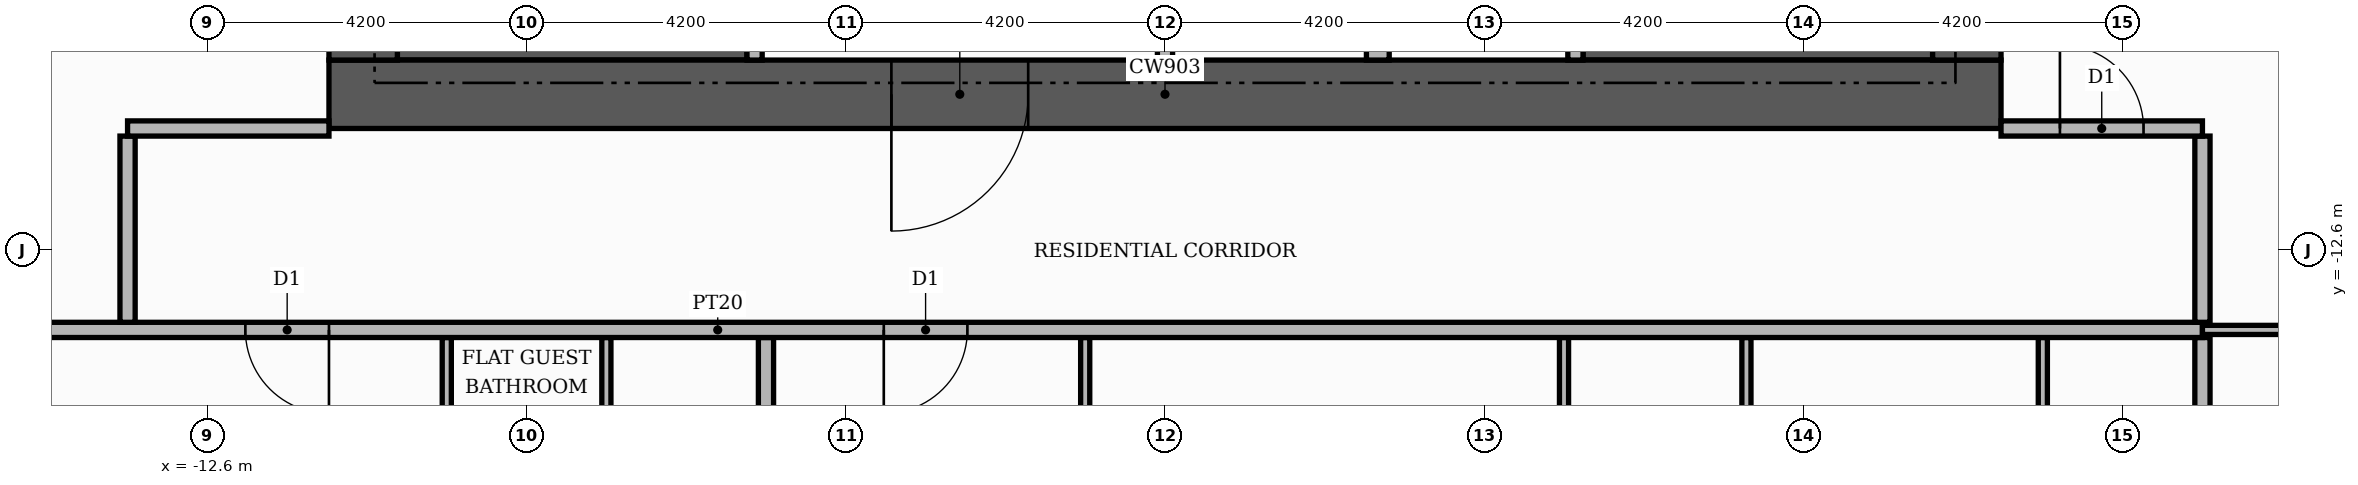
"""IFC4 building model, lengths in metres.
Left out: names, types, materials, properties, quantities, classifications, styles, units other than length and angle.
Written with IfcOpenShell. Run it as: python <this file> out.ifc"""

import sys

from ifc_helpers import new_model, si_unit, direction, frame, frame_2d, origin, place, context, subcontext, project, spatial, rectangle, extrude, element, fill, save


model = new_model("IFC4")
c1 = context("Model", 3, precision=1e-05, world=origin(), true_north=direction((0.0, 1.0)))
c2 = subcontext(c1, "Body", "Model", "MODEL_VIEW")
j1 = project(units=[si_unit("LENGTHUNIT", "METRE"), si_unit("PLANEANGLEUNIT", "RADIAN")], contexts=[c1])
p1 = place(None, origin())
s1 = spatial("IfcSite", under=j1, at=p1, CompositionType="ELEMENT")
p2 = place(p1, origin())
s2 = spatial("IfcBuilding", under=s1, at=p2, CompositionType="ELEMENT")
p3 = place(p2, frame((0.0, 0.0, 172.8)))
s3 = spatial("IfcBuildingStorey", under=s2, at=p3, CompositionType="ELEMENT", Elevation=172.8)
for number, where, z_axis, x_axis in (
    (1, (-10.1, -9.15, 0.0), (0.0, 0.0, 1.0), (1.0, 0.0, 0.0)),
    (2, (5.5, -9.15, 0.0), (0.0, 0.0, 1.0), (1.0, 0.0, 0.0)),
):
    element("IfcWall", number, at=place(p3, frame(where, z_axis=z_axis, x_axis=x_axis)), inside=s3, PredefinedType="SHEAR", context=c2, shape_type="SweptSolid", body=[
        extrude(rectangle(XDim=4.6, YDim=1.9, at=frame_2d((2.3, 0.0))), origin(), (0.0, 0.0, 1.0), 3.48),
    ])
p4 = place(p3, frame((-11.0, -10.55, 0.0), z_axis=(0.0, 0.0, 1.0), x_axis=(1.0, 0.0, 0.0)))
e3 = element("IfcWall", 3, at=p4, inside=s3, PredefinedType="SHEAR", context=c2, shape_type="SweptSolid", body=[
    extrude(rectangle(XDim=22.0, YDim=0.9, at=frame_2d((11.0, 0.0))), origin(), (0.0, 0.0, 1.0), 3.48),
])
p5 = place(p4, frame((7.4, 0.0, 0.0)))
e4 = element("IfcOpeningElement", 4, at=p5, cuts=e3, PredefinedType="OPENING", context=c2, shape_type="SweptSolid", body=[
    extrude(rectangle(XDim=1.8, YDim=2.2, at=frame_2d((0.9, 1.1))), frame((0.0, 0.46, 0.0), z_axis=(0.0, -1.0, 0.0), x_axis=(1.0, 0.0, 0.0)), (0.0, 0.0, 1.0), 0.92),
])
for number, where, z_axis, x_axis in (
    (5, (-10.55, -10.1, 0.0), (0.0, 0.0, 1.0), (0.0, 1.0, 0.0)),
    (6, (10.55, -10.1, 0.0), (0.0, 0.0, 1.0), (0.0, 1.0, 0.0)),
):
    element("IfcWall", number, at=place(p3, frame(where, z_axis=z_axis, x_axis=x_axis)), inside=s3, PredefinedType="SHEAR", context=c2, shape_type="SweptSolid", body=[
        extrude(rectangle(XDim=20.2, YDim=0.9, at=frame_2d((10.1, 0.0))), origin(), (0.0, 0.0, 1.0), 3.48),
    ])
p6 = place(p3, frame((-5.4, -10.1, 0.0), z_axis=(0.0, 0.0, 1.0), x_axis=(0.0, 1.0, 0.0)))
e7 = element("IfcWall", 7, at=p6, inside=s3, PredefinedType="PARTITIONING", context=c2, shape_type="SweptSolid", body=[
    extrude(rectangle(XDim=4.6, YDim=0.2, at=frame_2d((2.3, 0.0))), origin(), (0.0, 0.0, 1.0), 3.48),
])
p7 = place(p6, frame((2.9, 0.0, 0.0)))
e8 = element("IfcOpeningElement", 8, at=p7, cuts=e7, PredefinedType="OPENING", context=c2, shape_type="SweptSolid", body=[
    extrude(rectangle(XDim=1.0, YDim=2.1, at=frame_2d((0.5, 1.05))), frame((0.0, 0.11, 0.0), z_axis=(0.0, -1.0, 0.0), x_axis=(1.0, 0.0, 0.0)), (0.0, 0.0, 1.0), 0.22),
])
p8 = place(p3, frame((0.0, -10.1, 0.0), z_axis=(0.0, 0.0, 1.0), x_axis=(0.0, 1.0, 0.0)))
e9 = element("IfcWall", 9, at=p8, inside=s3, PredefinedType="PARTITIONING", context=c2, shape_type="SweptSolid", body=[
    extrude(rectangle(XDim=2.2, YDim=0.2, at=frame_2d((1.1, 0.0))), origin(), (0.0, 0.0, 1.0), 3.48),
])
p9 = place(p3, frame((2.8, -10.1, 0.0), z_axis=(0.0, 0.0, 1.0), x_axis=(0.0, 1.0, 0.0)))
e10 = element("IfcWall", 10, at=p9, inside=s3, PredefinedType="PARTITIONING", context=c2, shape_type="SweptSolid", body=[
    extrude(rectangle(XDim=2.2, YDim=0.3, at=frame_2d((1.1, 0.0))), origin(), (0.0, 0.0, 1.0), 3.48),
])
p10 = place(p3, frame((5.4, -10.1, 0.0), z_axis=(0.0, 0.0, 1.0), x_axis=(0.0, 1.0, 0.0)))
e11 = element("IfcWall", 11, at=p10, inside=s3, PredefinedType="PARTITIONING", context=c2, shape_type="SweptSolid", body=[
    extrude(rectangle(XDim=4.6, YDim=0.2, at=frame_2d((2.3, 0.0))), origin(), (0.0, 0.0, 1.0), 3.48),
])
p11 = place(p10, frame((2.9, 0.0, 0.0)))
e12 = element("IfcOpeningElement", 12, at=p11, cuts=e11, PredefinedType="OPENING", context=c2, shape_type="SweptSolid", body=[
    extrude(rectangle(XDim=1.0, YDim=2.1, at=frame_2d((0.5, 1.05))), frame((0.0, 0.11, 0.0), z_axis=(0.0, -1.0, 0.0), x_axis=(1.0, 0.0, 0.0)), (0.0, 0.0, 1.0), 0.22),
])
for number, where, z_axis, x_axis in (
    (13, (-5.25, -25.42, 0.0), (0.0, 0.0, 1.0), (0.0, 1.0, 0.0)),
    (14, (13.65, -25.42, 0.0), (0.0, 0.0, 1.0), (0.0, 1.0, 0.0)),
):
    element("IfcWall", number, at=place(p3, frame(where, z_axis=z_axis, x_axis=x_axis)), inside=s3, PredefinedType="PARTITIONING", context=c2, shape_type="SweptSolid", body=[
        extrude(rectangle(XDim=11.67, YDim=0.2, at=frame_2d((5.835, 0.0))), origin(), (0.0, 0.0, 1.0), 3.48),
    ])
for number, where, z_axis, x_axis in (
    (15, (-1.05, -18.86, 0.0), (0.0, 0.0, 1.0), (0.0, 1.0, 0.0)),
    (16, (5.25, -18.86, 0.0), (0.0, 0.0, 1.0), (0.0, 1.0, 0.0)),
    (17, (7.65, -18.86, 0.0), (0.0, 0.0, 1.0), (0.0, 1.0, 0.0)),
    (18, (11.55, -18.86, 0.0), (0.0, 0.0, 1.0), (0.0, 1.0, 0.0)),
):
    element("IfcWall", number, at=place(p3, frame(where, z_axis=z_axis, x_axis=x_axis)), inside=s3, PredefinedType="PARTITIONING", context=c2, shape_type="SweptSolid", body=[
        extrude(rectangle(XDim=5.11, YDim=0.12, at=frame_2d((2.555, 0.0))), origin(), (0.0, 0.0, 1.0), 3.48),
    ])
p12 = place(p3, frame((-9.45, -18.56, 0.0), z_axis=(0.0, 0.0, 1.0), x_axis=(0.0, 1.0, 0.0)))
e19 = element("IfcWall", 19, at=p12, inside=s3, PredefinedType="PARTITIONING", context=c2, shape_type="SweptSolid", body=[
    extrude(rectangle(XDim=4.81, YDim=0.12, at=frame_2d((2.405, 0.0))), origin(), (0.0, 0.0, 1.0), 3.48),
])
p13 = place(p12, frame((1.975, 0.0, 0.0)))
e20 = element("IfcOpeningElement", 20, at=p13, cuts=e19, PredefinedType="OPENING", context=c2, shape_type="SweptSolid", body=[
    extrude(rectangle(XDim=0.9, YDim=2.1, at=frame_2d((0.45, 1.05))), frame((0.0, 0.07, 0.0), z_axis=(0.0, -1.0, 0.0), x_axis=(1.0, 0.0, 0.0)), (0.0, 0.0, 1.0), 0.14),
])
p14 = place(p3, frame((-7.35, -18.56, 0.0), z_axis=(0.0, 0.0, 1.0), x_axis=(0.0, 1.0, 0.0)))
e21 = element("IfcWall", 21, at=p14, inside=s3, PredefinedType="PARTITIONING", context=c2, shape_type="SweptSolid", body=[
    extrude(rectangle(XDim=4.81, YDim=0.12, at=frame_2d((2.405, 0.0))), origin(), (0.0, 0.0, 1.0), 3.48),
])
p15 = place(p3, frame((-25.42, -13.65, 0.0), z_axis=(0.0, 0.0, 1.0), x_axis=(1.0, 0.0, 0.0)))
e22 = element("IfcWall", 22, at=p15, inside=s3, PredefinedType="PARTITIONING", context=c2, shape_type="SweptSolid", body=[
    extrude(rectangle(XDim=39.07, YDim=0.2, at=frame_2d((19.535, 0.0))), origin(), (0.0, 0.0, 1.0), 3.48),
])
p16 = place(p15, frame((13.32, 0.0, 0.0)))
e23 = element("IfcOpeningElement", 23, at=p16, cuts=e22, PredefinedType="OPENING", context=c2, shape_type="SweptSolid", body=[
    extrude(rectangle(XDim=1.1, YDim=2.4, at=frame_2d((0.55, 1.2))), frame((0.0, 0.11, 0.0), z_axis=(0.0, -1.0, 0.0), x_axis=(1.0, 0.0, 0.0)), (0.0, 0.0, 1.0), 0.22),
])
p17 = place(p15, frame((21.72, 0.0, 0.0)))
e24 = element("IfcOpeningElement", 24, at=p17, cuts=e22, PredefinedType="OPENING", context=c2, shape_type="SweptSolid", body=[
    extrude(rectangle(XDim=1.1, YDim=2.4, at=frame_2d((0.55, 1.2))), frame((0.0, 0.11, 0.0), z_axis=(0.0, -1.0, 0.0), x_axis=(1.0, 0.0, 0.0)), (0.0, 0.0, 1.0), 0.22),
])
p18 = place(p3, frame((13.65, -13.65, 0.0), z_axis=(0.0, 0.0, 1.0), x_axis=(1.0, 0.0, 0.0)))
e25 = element("IfcWall", 25, at=p18, inside=s3, PredefinedType="PARTITIONING", context=c2, shape_type="SweptSolid", body=[
    extrude(rectangle(XDim=6.47, YDim=0.12, at=frame_2d((3.235, 0.0))), origin(), (0.0, 0.0, 1.0), 3.48),
])
p19 = place(p18, frame((2.785, 0.0, 0.0)))
e26 = element("IfcOpeningElement", 26, at=p19, cuts=e25, PredefinedType="OPENING", context=c2, shape_type="SweptSolid", body=[
    extrude(rectangle(XDim=0.9, YDim=2.1, at=frame_2d((0.45, 1.05))), frame((0.0, 0.07, 0.0), z_axis=(0.0, -1.0, 0.0), x_axis=(1.0, 0.0, 0.0)), (0.0, 0.0, 1.0), 0.14),
])
for number, where, z_axis, x_axis in (
    (27, (-13.65, -13.55, 0.0), (0.0, 0.0, 1.0), (0.0, 1.0, 0.0)),
    (28, (13.65, -13.55, 0.0), (0.0, 0.0, 1.0), (0.0, 1.0, 0.0)),
):
    element("IfcWall", number, at=place(p3, frame(where, z_axis=z_axis, x_axis=x_axis)), inside=s3, PredefinedType="PARTITIONING", context=c2, shape_type="SweptSolid", body=[
        extrude(rectangle(XDim=2.45, YDim=0.2, at=frame_2d((1.225, 0.0))), origin(), (0.0, 0.0, 1.0), 3.48),
    ])
p20 = place(p3, frame((-13.65, -11.0, 0.0), z_axis=(0.0, 0.0, 1.0), x_axis=(1.0, 0.0, 0.0)))
e29 = element("IfcWall", 29, at=p20, inside=s3, PredefinedType="PARTITIONING", context=c2, shape_type="SweptSolid", body=[
    extrude(rectangle(XDim=2.65, YDim=0.2, at=frame_2d((1.325, 0.0))), origin(), (0.0, 0.0, 1.0), 3.48),
])
p21 = place(p3, frame((11.0, -11.0, 0.0), z_axis=(0.0, 0.0, 1.0), x_axis=(1.0, 0.0, 0.0)))
e30 = element("IfcWall", 30, at=p21, inside=s3, PredefinedType="PARTITIONING", context=c2, shape_type="SweptSolid", body=[
    extrude(rectangle(XDim=2.65, YDim=0.2, at=frame_2d((1.325, 0.0))), origin(), (0.0, 0.0, 1.0), 3.48),
])
p22 = place(p21, frame((0.775, 0.0, 0.0)))
e31 = element("IfcOpeningElement", 31, at=p22, cuts=e30, PredefinedType="OPENING", context=c2, shape_type="SweptSolid", body=[
    extrude(rectangle(XDim=1.1, YDim=2.4, at=frame_2d((0.55, 1.2))), frame((0.0, 0.11, 0.0), z_axis=(0.0, -1.0, 0.0), x_axis=(1.0, 0.0, 0.0)), (0.0, 0.0, 1.0), 0.22),
])
p23 = place(p5, frame((1.8, 0.0, 0.0), z_axis=(0.0, 0.0, 1.0), x_axis=(-1.0, 0.0, 0.0)))
e32 = element("IfcDoor", 32, at=p23, inside=s3, OperationType="DOUBLE_DOOR_SINGLE_SWING", PredefinedType="DOOR", context=c2, shape_type="SweptSolid", body=[
    extrude(rectangle(XDim=1.8, YDim=2.2, at=frame_2d((0.9, 1.1))), frame((0.0, 0.025, 0.0), z_axis=(0.0, -1.0, 0.0), x_axis=(1.0, 0.0, 0.0)), (0.0, 0.0, 1.0), 0.05),
])
fill(e4, e32)
p24 = place(p16, frame((1.1, 0.0, 0.0), z_axis=(0.0, 0.0, 1.0), x_axis=(-1.0, 0.0, 0.0)))
e33 = element("IfcDoor", 33, at=p24, inside=s3, OperationType="SINGLE_SWING_RIGHT", PredefinedType="DOOR", context=c2, shape_type="SweptSolid", body=[
    extrude(rectangle(XDim=1.1, YDim=2.4, at=frame_2d((0.55, 1.2))), frame((0.0, 0.025, 0.0), z_axis=(0.0, -1.0, 0.0), x_axis=(1.0, 0.0, 0.0)), (0.0, 0.0, 1.0), 0.05),
])
fill(e23, e33)
p25 = place(p17, frame((1.1, 0.0, 0.0), z_axis=(0.0, 0.0, 1.0), x_axis=(-1.0, 0.0, 0.0)))
e34 = element("IfcDoor", 34, at=p25, inside=s3, OperationType="SINGLE_SWING_LEFT", PredefinedType="DOOR", context=c2, shape_type="SweptSolid", body=[
    extrude(rectangle(XDim=1.1, YDim=2.4, at=frame_2d((0.55, 1.2))), frame((0.0, 0.025, 0.0), z_axis=(0.0, -1.0, 0.0), x_axis=(1.0, 0.0, 0.0)), (0.0, 0.0, 1.0), 0.05),
])
fill(e24, e34)
p26 = place(p22, origin())
e35 = element("IfcDoor", 35, at=p26, inside=s3, OperationType="SINGLE_SWING_LEFT", PredefinedType="DOOR", context=c2, shape_type="SweptSolid", body=[
    extrude(rectangle(XDim=1.1, YDim=2.4, at=frame_2d((0.55, 1.2))), frame((0.0, 0.025, 0.0), z_axis=(0.0, -1.0, 0.0), x_axis=(1.0, 0.0, 0.0)), (0.0, 0.0, 1.0), 0.05),
])
fill(e31, e35)
save(model, sys.argv[1])
